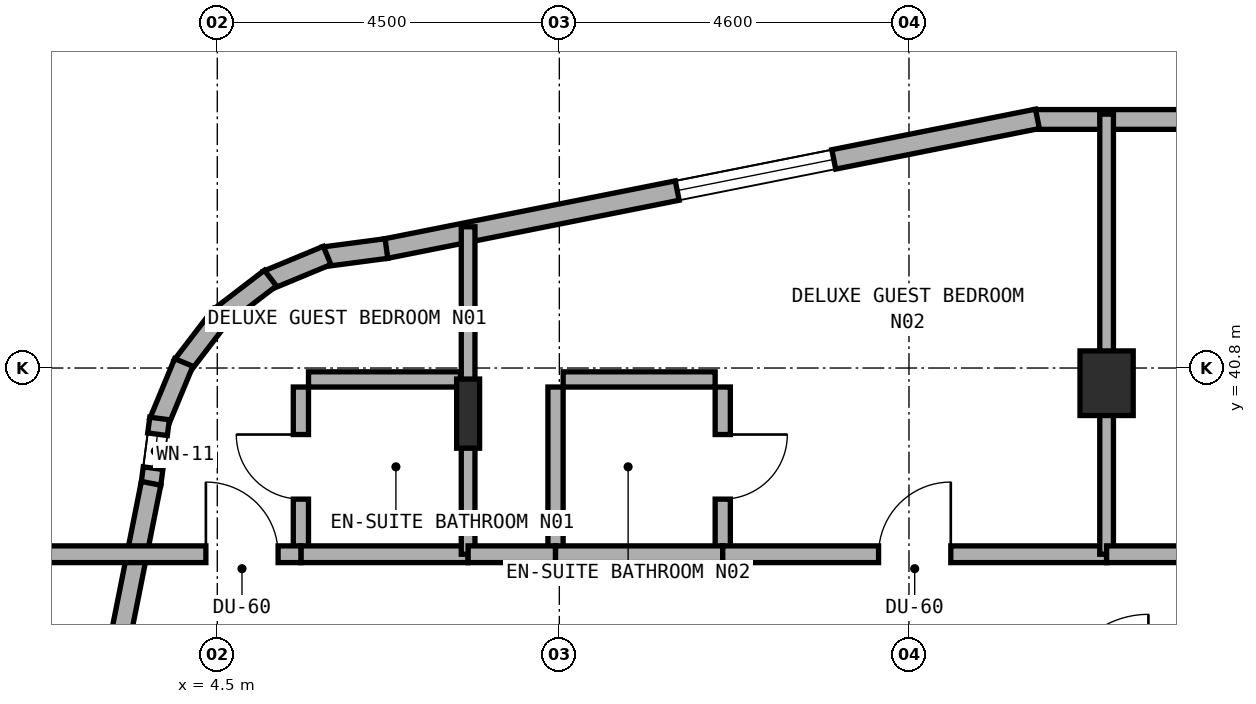
"""IFC4 building model, lengths in metres.
Left out: names, types, materials, properties, quantities, classifications, styles, units other than length and angle.
Written with IfcOpenShell. Run it as: python <this file> out.ifc"""

import sys

from ifc_helpers import new_model, si_unit, direction, frame, frame_2d, origin, origin_2d, place, context, subcontext, project, spatial, rectangle, i_section, extrude, element, fill, save


model = new_model("IFC4")
c1 = context("Model", 3, precision=1e-05, world=origin(), true_north=direction((0.0, 1.0)))
c2 = subcontext(c1, "Body", "Model", "MODEL_VIEW")
j1 = project(units=[si_unit("LENGTHUNIT", "METRE"), si_unit("PLANEANGLEUNIT", "RADIAN")], contexts=[c1])
p1 = place(None, origin())
s1 = spatial("IfcSite", under=j1, at=p1, CompositionType="ELEMENT")
p2 = place(p1, origin())
s2 = spatial("IfcBuilding", under=s1, at=p2, CompositionType="ELEMENT")
p3 = place(p2, frame((0.0, 0.0, 199.1)))
s3 = spatial("IfcBuildingStorey", under=s2, at=p3, CompositionType="ELEMENT", Elevation=199.1)
p4 = place(p3, frame((16.2, 40.6, 0.0), z_axis=(0.0, 0.0, 1.0), x_axis=(1.0, 0.0, 0.0)))
e1 = element("IfcColumn", 1, at=p4, inside=s3, PredefinedType="COLUMN", context=c2, shape_type="SweptSolid", body=[
    extrude(rectangle(XDim=0.7, YDim=0.85, at=origin_2d()), origin(), (0.0, 0.0, 1.0), 3.6),
])
p5 = place(p3, frame((7.8, 40.2, 0.0), z_axis=(0.0, 0.0, 1.0), x_axis=(1.0, 0.0, 0.0)))
e2 = element("IfcColumn", 2, at=p5, inside=s3, PredefinedType="COLUMN", context=c2, shape_type="SweptSolid", body=[
    extrude(i_section(OverallWidth=0.302, OverallDepth=0.91, WebThickness=0.021, FlangeThickness=0.04, FilletRadius=0.03, at=origin_2d()), origin(), (0.0, 0.0, 1.0), 3.6),
])
p6 = place(p3, frame((26.785, 44.07, 0.0), z_axis=(0.0, 0.0, 1.0), x_axis=(-1.0, 0.0, 0.0)))
e3 = element("IfcWall", 3, at=p6, inside=s3, PredefinedType="STANDARD", context=c2, shape_type="SweptSolid", body=[
    extrude(rectangle(XDim=11.535, YDim=0.26, at=frame_2d((5.768, 0.0))), origin(), (0.0, 0.0, 1.0), 3.32),
])
p7 = place(p6, frame((5.185, 0.0, 0.0)))
e4 = element("IfcOpeningElement", 4, at=p7, cuts=e3, PredefinedType="OPENING", context=c2, shape_type="SweptSolid", body=[
    extrude(rectangle(XDim=1.2, YDim=2.15, at=frame_2d((0.6, 1.075))), frame((0.0, 0.14, 0.0), z_axis=(0.0, -1.0, 0.0), x_axis=(1.0, 0.0, 0.0)), (0.0, 0.0, 1.0), 0.28),
])
p8 = place(p6, frame((1.437, 0.0, 0.85)))
e5 = element("IfcOpeningElement", 5, at=p8, cuts=e3, PredefinedType="OPENING", context=c2, shape_type="SweptSolid", body=[
    extrude(rectangle(XDim=2.1, YDim=1.5, at=frame_2d((1.05, 0.75))), frame((0.0, 0.14, 0.0), z_axis=(0.0, -1.0, 0.0), x_axis=(1.0, 0.0, 0.0)), (0.0, 0.0, 1.0), 0.28),
])
p9 = place(p6, frame((7.51, 0.0, 0.85)))
e6 = element("IfcOpeningElement", 6, at=p9, cuts=e3, PredefinedType="OPENING", context=c2, shape_type="SweptSolid", body=[
    extrude(rectangle(XDim=2.1, YDim=1.5, at=frame_2d((1.05, 0.75))), frame((0.0, 0.14, 0.0), z_axis=(0.0, -1.0, 0.0), x_axis=(1.0, 0.0, 0.0)), (0.0, 0.0, 1.0), 0.28),
])
p10 = place(p3, frame((15.29, 44.078, 0.0), z_axis=(0.0, 0.0, 1.0), x_axis=(-0.980752174324, -0.195256683773, 0.0)))
e7 = element("IfcWall", 7, at=p10, inside=s3, PredefinedType="STANDARD", context=c2, shape_type="SweptSolid", body=[
    extrude(rectangle(XDim=8.741, YDim=0.26, at=frame_2d((4.371, 0.0))), origin(), (0.0, 0.0, 1.0), 3.32),
])
p11 = place(p10, frame((2.732, 0.0, 0.85)))
e8 = element("IfcOpeningElement", 8, at=p11, cuts=e7, PredefinedType="OPENING", context=c2, shape_type="SweptSolid", body=[
    extrude(rectangle(XDim=2.1, YDim=1.5, at=frame_2d((1.05, 0.75))), frame((0.0, 0.14, 0.0), z_axis=(0.0, -1.0, 0.0), x_axis=(1.0, 0.0, 0.0)), (0.0, 0.0, 1.0), 0.28),
])
p12 = place(p3, frame((6.725, 42.372, 0.0), z_axis=(0.0, 0.0, 1.0), x_axis=(-0.9913883573, -0.130954667764, 0.0)))
e9 = element("IfcWall", 9, at=p12, inside=s3, PredefinedType="STANDARD", context=c2, shape_type="SweptSolid", body=[
    extrude(rectangle(XDim=0.833, YDim=0.26, at=frame_2d((0.417, 0.0))), origin(), (0.0, 0.0, 1.0), 3.32),
])
p13 = place(p3, frame((5.945, 42.281, 0.0), z_axis=(0.0, 0.0, 1.0), x_axis=(-0.923754491172, -0.382985169477, 0.0)))
e10 = element("IfcWall", 10, at=p13, inside=s3, PredefinedType="STANDARD", context=c2, shape_type="SweptSolid", body=[
    extrude(rectangle(XDim=0.851, YDim=0.26, at=frame_2d((0.426, 0.0))), origin(), (0.0, 0.0, 1.0), 3.32),
])
for number, where, z_axis, x_axis in (
    (11, (5.199, 41.983, 0.0), (0.0, 0.0, 1.0), (-0.794, -0.608, 0.0)),
    (12, (4.555, 41.504, 0.0), (0.0, 0.0, 1.0), (-0.608, -0.794, 0.0)),
):
    element("IfcWall", number, at=place(p3, frame(where, z_axis=z_axis, x_axis=x_axis)), inside=s3, PredefinedType="STANDARD", context=c2, shape_type="SweptSolid", body=[
        extrude(rectangle(XDim=0.85, YDim=0.26, at=frame_2d((0.425, 0.0))), origin(), (0.0, 0.0, 1.0), 3.32),
    ])
p14 = place(p3, frame((4.059, 40.873, 0.0), z_axis=(0.0, 0.0, 1.0), x_axis=(-0.383229930484, -0.923652976167, 0.0)))
e13 = element("IfcWall", 13, at=p14, inside=s3, PredefinedType="STANDARD", context=c2, shape_type="SweptSolid", body=[
    extrude(rectangle(XDim=0.851, YDim=0.26, at=frame_2d((0.426, 0.0))), origin(), (0.0, 0.0, 1.0), 3.32),
])
p15 = place(p3, frame((3.741, 40.136, 0.0), z_axis=(0.0, 0.0, 1.0), x_axis=(-0.130156359936, -0.991493480548, 0.0)))
e14 = element("IfcWall", 14, at=p15, inside=s3, PredefinedType="STANDARD", context=c2, shape_type="SweptSolid", body=[
    extrude(rectangle(XDim=0.868, YDim=0.26, at=frame_2d((0.434, 0.0))), origin(), (0.0, 0.0, 1.0), 3.32),
])
p16 = place(p15, frame((0.209, 0.0, 0.85)))
e15 = element("IfcOpeningElement", 15, at=p16, cuts=e14, PredefinedType="OPENING", context=c2, shape_type="SweptSolid", body=[
    extrude(rectangle(XDim=0.45, YDim=1.5, at=frame_2d((0.225, 0.75))), frame((0.0, 0.14, 0.0), z_axis=(0.0, -1.0, 0.0), x_axis=(1.0, 0.0, 0.0)), (0.0, 0.0, 1.0), 0.28),
])
p17 = place(p3, frame((3.629, 39.283, 0.0), z_axis=(0.0, 0.0, 1.0), x_axis=(-0.195291715883, -0.980745199176, 0.0)))
e16 = element("IfcWall", 16, at=p17, inside=s3, PredefinedType="STANDARD", context=c2, shape_type="SweptSolid", body=[
    extrude(rectangle(XDim=8.771, YDim=0.26, at=frame_2d((4.385, 0.0))), origin(), (0.0, 0.0, 1.0), 3.32),
])
p18 = place(p17, frame((3.873, 0.0, 0.85)))
e17 = element("IfcOpeningElement", 17, at=p18, cuts=e16, PredefinedType="OPENING", context=c2, shape_type="SweptSolid", body=[
    extrude(rectangle(XDim=2.1, YDim=1.5, at=frame_2d((1.05, 0.75))), frame((0.0, 0.14, 0.0), z_axis=(0.0, -1.0, 0.0), x_axis=(1.0, 0.0, 0.0)), (0.0, 0.0, 1.0), 0.28),
])
p19 = place(p3, frame((5.6, 38.45, 0.0), z_axis=(0.0, 0.0, 1.0), x_axis=(0.0, 1.0, 0.0)))
e18 = element("IfcWall", 18, at=p19, inside=s3, PredefinedType="PLUMBINGWALL", context=c2, shape_type="SweptSolid", body=[
    extrude(rectangle(XDim=2.1, YDim=0.2, at=frame_2d((1.05, 0.0))), origin(), (0.0, 0.0, 1.0), 3.32),
])
p20 = place(p19, frame((0.625, 0.0, 0.0)))
e19 = element("IfcOpeningElement", 19, at=p20, cuts=e18, PredefinedType="OPENING", context=c2, shape_type="SweptSolid", body=[
    extrude(rectangle(XDim=0.85, YDim=2.1, at=frame_2d((0.425, 1.05))), frame((0.0, 0.11, 0.0), z_axis=(0.0, -1.0, 0.0), x_axis=(1.0, 0.0, 0.0)), (0.0, 0.0, 1.0), 0.22),
])
p21 = place(p3, frame((5.7, 40.65, 0.0), z_axis=(0.0, 0.0, 1.0), x_axis=(1.0, 0.0, 0.0)))
e20 = element("IfcWall", 20, at=p21, inside=s3, PredefinedType="PLUMBINGWALL", context=c2, shape_type="SweptSolid", body=[
    extrude(rectangle(XDim=2.0, YDim=0.2, at=frame_2d((1.0, 0.0))), origin(), (0.0, 0.0, 1.0), 3.32),
])
p22 = place(p3, frame((5.6, 38.35, 0.0), z_axis=(0.0, 0.0, 1.0), x_axis=(1.0, 0.0, 0.0)))
e21 = element("IfcWall", 21, at=p22, inside=s3, PredefinedType="SOLIDWALL", context=c2, shape_type="SweptSolid", body=[
    extrude(rectangle(XDim=2.2, YDim=0.22, at=frame_2d((1.1, 0.0))), origin(), (0.0, 0.0, 1.0), 2.695),
])
p23 = place(p3, frame((1.96, 38.35, 0.0), z_axis=(0.0, 0.0, 1.0), x_axis=(1.0, 0.0, 0.0)))
e22 = element("IfcWall", 22, at=p23, inside=s3, PredefinedType="SOLIDWALL", context=c2, shape_type="SweptSolid", body=[
    extrude(rectangle(XDim=3.64, YDim=0.22, at=frame_2d((1.82, 0.0))), origin(), (0.0, 0.0, 1.0), 3.32),
])
p24 = place(p23, frame((2.39, 0.0, 0.0)))
e23 = element("IfcOpeningElement", 23, at=p24, cuts=e22, PredefinedType="OPENING", context=c2, shape_type="SweptSolid", body=[
    extrude(rectangle(XDim=0.95, YDim=2.1, at=frame_2d((0.475, 1.05))), frame((0.0, 0.12, 0.0), z_axis=(0.0, -1.0, 0.0), x_axis=(1.0, 0.0, 0.0)), (0.0, 0.0, 1.0), 0.24),
])
p25 = place(p3, frame((7.8, 38.35, 0.0), z_axis=(0.0, 0.0, 1.0), x_axis=(0.0, 1.0, 0.0)))
e24 = element("IfcWall", 24, at=p25, inside=s3, PredefinedType="SOLIDWALL", context=c2, shape_type="SweptSolid", body=[
    extrude(rectangle(XDim=4.308, YDim=0.18, at=frame_2d((2.154, 0.0))), origin(), (0.0, 0.0, 1.0), 2.695),
])
p26 = place(p3, frame((11.15, 38.45, 0.0), z_axis=(0.0, 0.0, 1.0), x_axis=(0.0, 1.0, 0.0)))
e25 = element("IfcWall", 25, at=p26, inside=s3, PredefinedType="PLUMBINGWALL", context=c2, shape_type="SweptSolid", body=[
    extrude(rectangle(XDim=2.1, YDim=0.2, at=frame_2d((1.05, 0.0))), origin(), (0.0, 0.0, 1.0), 3.015),
])
p27 = place(p26, frame((0.625, 0.0, 0.0)))
e26 = element("IfcOpeningElement", 26, at=p27, cuts=e25, PredefinedType="OPENING", context=c2, shape_type="SweptSolid", body=[
    extrude(rectangle(XDim=0.85, YDim=2.1, at=frame_2d((0.425, 1.05))), frame((0.0, 0.11, 0.0), z_axis=(0.0, -1.0, 0.0), x_axis=(1.0, 0.0, 0.0)), (0.0, 0.0, 1.0), 0.22),
])
p28 = place(p3, frame((9.05, 40.65, 0.0), z_axis=(0.0, 0.0, 1.0), x_axis=(1.0, 0.0, 0.0)))
e27 = element("IfcWall", 27, at=p28, inside=s3, PredefinedType="PLUMBINGWALL", context=c2, shape_type="SweptSolid", body=[
    extrude(rectangle(XDim=2.0, YDim=0.2, at=frame_2d((1.0, 0.0))), origin(), (0.0, 0.0, 1.0), 3.32),
])
p29 = place(p3, frame((8.95, 38.45, 0.0), z_axis=(0.0, 0.0, 1.0), x_axis=(0.0, 1.0, 0.0)))
e28 = element("IfcWall", 28, at=p29, inside=s3, PredefinedType="PLUMBINGWALL", context=c2, shape_type="SweptSolid", body=[
    extrude(rectangle(XDim=2.1, YDim=0.2, at=frame_2d((1.05, 0.0))), origin(), (0.0, 0.0, 1.0), 3.015),
])
p30 = place(p3, frame((7.8, 38.35, 0.0), z_axis=(0.0, 0.0, 1.0), x_axis=(1.0, 0.0, 0.0)))
e29 = element("IfcWall", 29, at=p30, inside=s3, PredefinedType="SOLIDWALL", context=c2, shape_type="SweptSolid", body=[
    extrude(rectangle(XDim=1.15, YDim=0.22, at=frame_2d((0.575, 0.0))), origin(), (0.0, 0.0, 1.0), 2.695),
])
p31 = place(p3, frame((8.95, 38.35, 0.0), z_axis=(0.0, 0.0, 1.0), x_axis=(1.0, 0.0, 0.0)))
e30 = element("IfcWall", 30, at=p31, inside=s3, PredefinedType="SOLIDWALL", context=c2, shape_type="SweptSolid", body=[
    extrude(rectangle(XDim=2.2, YDim=0.22, at=frame_2d((1.1, 0.0))), origin(), (0.0, 0.0, 1.0), 3.32),
])
p32 = place(p3, frame((11.15, 38.35, 0.0), z_axis=(0.0, 0.0, 1.0), x_axis=(1.0, 0.0, 0.0)))
e31 = element("IfcWall", 31, at=p32, inside=s3, PredefinedType="SOLIDWALL", context=c2, shape_type="SweptSolid", body=[
    extrude(rectangle(XDim=5.05, YDim=0.22, at=frame_2d((2.525, 0.0))), origin(), (0.0, 0.0, 1.0), 2.695),
])
p33 = place(p32, frame((2.05, 0.0, 0.0)))
e32 = element("IfcOpeningElement", 32, at=p33, cuts=e31, PredefinedType="OPENING", context=c2, shape_type="SweptSolid", body=[
    extrude(rectangle(XDim=0.95, YDim=2.1, at=frame_2d((0.475, 1.05))), frame((0.0, 0.12, 0.0), z_axis=(0.0, -1.0, 0.0), x_axis=(1.0, 0.0, 0.0)), (0.0, 0.0, 1.0), 0.24),
])
p34 = place(p3, frame((16.2, 38.35, 0.0), z_axis=(0.0, 0.0, 1.0), x_axis=(0.0, 1.0, 0.0)))
e33 = element("IfcWall", 33, at=p34, inside=s3, PredefinedType="SOLIDWALL", context=c2, shape_type="SweptSolid", body=[
    extrude(rectangle(XDim=5.79, YDim=0.18, at=frame_2d((2.895, 0.0))), origin(), (0.0, 0.0, 1.0), 2.695),
])
p35 = place(p3, frame((16.2, 38.35, 0.0), z_axis=(0.0, 0.0, 1.0), x_axis=(1.0, 0.0, 0.0)))
e34 = element("IfcWall", 34, at=p35, inside=s3, PredefinedType="SOLIDWALL", context=c2, shape_type="SweptSolid", body=[
    extrude(rectangle(XDim=14.65, YDim=0.22, at=frame_2d((7.325, 0.0))), origin(), (0.0, 0.0, 1.0), 2.695),
])
p36 = place(p35, frame((6.85, 0.0, 0.0)))
e35 = element("IfcOpeningElement", 35, at=p36, cuts=e34, PredefinedType="OPENING", context=c2, shape_type="SweptSolid", body=[
    extrude(rectangle(XDim=0.95, YDim=2.1, at=frame_2d((0.475, 1.05))), frame((0.0, 0.12, 0.0), z_axis=(0.0, -1.0, 0.0), x_axis=(1.0, 0.0, 0.0)), (0.0, 0.0, 1.0), 0.24),
])
p37 = place(p11, origin())
e36 = element("IfcWindow", 36, at=p37, inside=s3, PartitioningType="SINGLE_PANEL", PredefinedType="WINDOW", context=c2, shape_type="SweptSolid", body=[
    extrude(rectangle(XDim=2.1, YDim=1.5, at=frame_2d((1.05, 0.75))), frame((0.0, 0.03, 0.0), z_axis=(0.0, -1.0, 0.0), x_axis=(1.0, 0.0, 0.0)), (0.0, 0.0, 1.0), 0.06),
])
fill(e8, e36)
p38 = place(p16, origin())
e37 = element("IfcWindow", 37, at=p38, inside=s3, PartitioningType="SINGLE_PANEL", PredefinedType="WINDOW", context=c2, shape_type="SweptSolid", body=[
    extrude(rectangle(XDim=0.45, YDim=1.5, at=frame_2d((0.225, 0.75))), frame((0.0, 0.03, 0.0), z_axis=(0.0, -1.0, 0.0), x_axis=(1.0, 0.0, 0.0)), (0.0, 0.0, 1.0), 0.06),
])
fill(e15, e37)
p39 = place(p20, origin())
e38 = element("IfcDoor", 38, at=p39, inside=s3, OperationType="SINGLE_SWING_RIGHT", PredefinedType="DOOR", context=c2, shape_type="SweptSolid", body=[
    extrude(rectangle(XDim=0.85, YDim=2.1, at=frame_2d((0.425, 1.05))), frame((0.0, 0.025, 0.0), z_axis=(0.0, -1.0, 0.0), x_axis=(1.0, 0.0, 0.0)), (0.0, 0.0, 1.0), 0.05),
])
fill(e19, e38)
p40 = place(p24, origin())
e39 = element("IfcDoor", 39, at=p40, inside=s3, OperationType="SINGLE_SWING_LEFT", PredefinedType="DOOR", context=c2, shape_type="SweptSolid", body=[
    extrude(rectangle(XDim=0.95, YDim=2.1, at=frame_2d((0.475, 1.05))), frame((0.0, 0.025, 0.0), z_axis=(0.0, -1.0, 0.0), x_axis=(1.0, 0.0, 0.0)), (0.0, 0.0, 1.0), 0.05),
])
fill(e23, e39)
p41 = place(p27, frame((0.85, 0.0, 0.0), z_axis=(0.0, 0.0, 1.0), x_axis=(-1.0, 0.0, 0.0)))
e40 = element("IfcDoor", 40, at=p41, inside=s3, OperationType="SINGLE_SWING_LEFT", PredefinedType="DOOR", context=c2, shape_type="SweptSolid", body=[
    extrude(rectangle(XDim=0.85, YDim=2.1, at=frame_2d((0.425, 1.05))), frame((0.0, 0.025, 0.0), z_axis=(0.0, -1.0, 0.0), x_axis=(1.0, 0.0, 0.0)), (0.0, 0.0, 1.0), 0.05),
])
fill(e26, e40)
p42 = place(p33, origin())
e41 = element("IfcDoor", 41, at=p42, inside=s3, OperationType="SINGLE_SWING_RIGHT", PredefinedType="DOOR", context=c2, shape_type="SweptSolid", body=[
    extrude(rectangle(XDim=0.95, YDim=2.1, at=frame_2d((0.475, 1.05))), frame((0.0, 0.025, 0.0), z_axis=(0.0, -1.0, 0.0), x_axis=(1.0, 0.0, 0.0)), (0.0, 0.0, 1.0), 0.05),
])
fill(e32, e41)
save(model, sys.argv[1])
